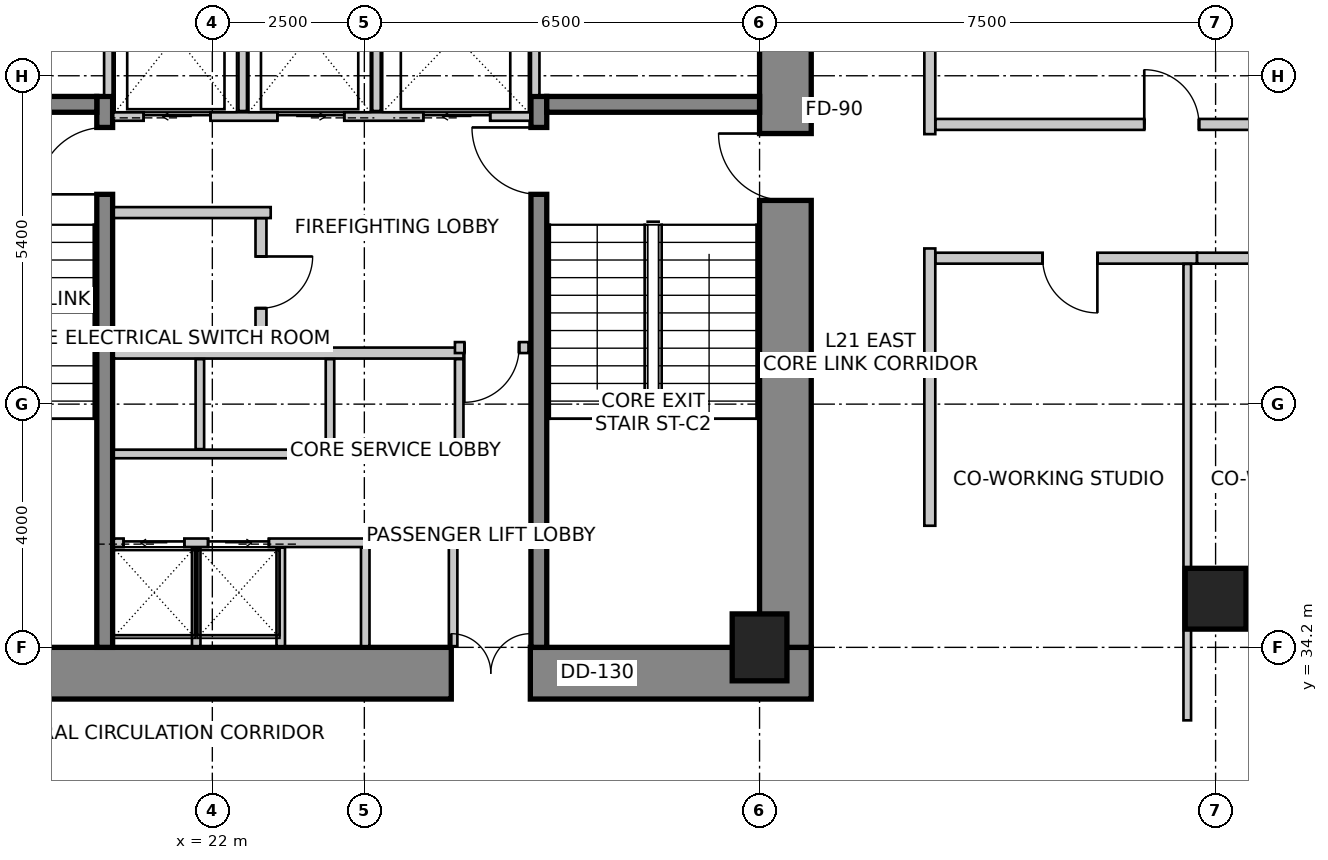
"""IFC4 building model, lengths in metres.
Left out: names, types, materials, properties, quantities, classifications, styles, units other than length and angle.
Written with IfcOpenShell. Run it as: python <this file> out.ifc"""

import sys

from ifc_helpers import new_model, si_unit, direction, frame, frame_2d, origin, origin_2d, place, context, subcontext, project, spatial, rectangle, extrude, source, transform, mapped, element, fill, save


model = new_model("IFC4")
c1 = context("Model", 3, precision=1e-05, world=origin(), true_north=direction((0.0, 1.0)))
c2 = subcontext(c1, "Body", "Model", "MODEL_VIEW")
j1 = project(units=[si_unit("LENGTHUNIT", "METRE"), si_unit("PLANEANGLEUNIT", "RADIAN")], contexts=[c1])
p1 = place(None, origin())
s1 = spatial("IfcSite", under=j1, at=p1, CompositionType="ELEMENT")
p2 = place(p1, origin())
s2 = spatial("IfcBuilding", under=s1, at=p2, CompositionType="ELEMENT")
p3 = place(p2, frame((0.0, 0.0, 87.0)))
s3 = spatial("IfcBuildingStorey", under=s2, at=p3, CompositionType="ELEMENT", Elevation=87.0)
p4 = place(p3, frame((15.75, 33.775, 0.0), z_axis=(0.0, 0.0, 1.0), x_axis=(1.0, 0.0, 0.0)))
e1 = element("IfcWall", 1, at=p4, inside=s3, PredefinedType="SHEAR", context=c2, shape_type="SweptSolid", body=[
    extrude(rectangle(XDim=16.1, YDim=0.85, at=frame_2d((8.05, 0.0))), origin(), (0.0, 0.0, 1.0), 4.0),
])
m1 = source(origin(), c2, "Body", "SweptSolid", [
    extrude(rectangle(XDim=1.3, YDim=2.15, at=frame_2d((0.65, 1.075))), frame((0.0, 0.435, 0.0), z_axis=(0.0, -1.0, 0.0), x_axis=(1.0, 0.0, 0.0)), (0.0, 0.0, 1.0), 0.87),
])
p5 = place(p4, frame((10.18, 0.0, 0.0)))
e2 = element("IfcOpeningElement", 2, at=p5, cuts=e1, PredefinedType="OPENING", context=c2, shape_type="MappedRepresentation", body=[
    mapped(m1, transform((0.0, 0.0, 0.0), scale=1.0)),
])
p6 = place(p3, frame((31.425, 34.2, 0.0), z_axis=(0.0, 0.0, 1.0), x_axis=(0.0, 1.0, 0.0)))
e3 = element("IfcWall", 3, at=p6, inside=s3, PredefinedType="SHEAR", context=c2, shape_type="SweptSolid", body=[
    extrude(rectangle(XDim=11.4, YDim=0.85, at=frame_2d((5.7, 0.0))), origin(), (0.0, 0.0, 1.0), 4.0),
])
m2 = source(origin(), c2, "Body", "SweptSolid", [
    extrude(rectangle(XDim=1.1, YDim=2.15, at=frame_2d((0.55, 1.075))), frame((0.0, 0.435, 0.0), z_axis=(0.0, -1.0, 0.0), x_axis=(1.0, 0.0, 0.0)), (0.0, 0.0, 1.0), 0.87),
])
p7 = place(p6, frame((7.35, 0.0, 0.0)))
e4 = element("IfcOpeningElement", 4, at=p7, cuts=e3, PredefinedType="OPENING", context=c2, shape_type="MappedRepresentation", body=[
    mapped(m2, transform((0.0, 0.0, 0.0), scale=1.0)),
])
p8 = place(p3, frame((20.23, 34.2, 0.0), z_axis=(0.0, 0.0, 1.0), x_axis=(0.0, 1.0, 0.0)))
e5 = element("IfcWall", 5, at=p8, inside=s3, PredefinedType="SHEAR", context=c2, shape_type="SweptSolid", body=[
    extrude(rectangle(XDim=9.06, YDim=0.26, at=frame_2d((4.53, 0.0))), origin(), (0.0, 0.0, 1.0), 4.0),
])
m3 = source(origin(), c2, "Body", "SweptSolid", [
    extrude(rectangle(XDim=1.1, YDim=2.15, at=frame_2d((0.55, 1.075))), frame((0.0, 0.14, 0.0), z_axis=(0.0, -1.0, 0.0), x_axis=(1.0, 0.0, 0.0)), (0.0, 0.0, 1.0), 0.28),
])
p9 = place(p8, frame((7.45, 0.0, 0.0)))
e6 = element("IfcOpeningElement", 6, at=p9, cuts=e5, PredefinedType="OPENING", context=c2, shape_type="MappedRepresentation", body=[
    mapped(m3, transform((0.0, 0.0, 0.0), scale=1.0)),
])
p10 = place(p3, frame((27.37, 34.2, 0.0), z_axis=(0.0, 0.0, 1.0), x_axis=(0.0, 1.0, 0.0)))
e7 = element("IfcWall", 7, at=p10, inside=s3, PredefinedType="SHEAR", context=c2, shape_type="SweptSolid", body=[
    extrude(rectangle(XDim=9.06, YDim=0.26, at=frame_2d((4.53, 0.0))), origin(), (0.0, 0.0, 1.0), 4.0),
])
p11 = place(p10, frame((7.45, 0.0, 0.0)))
e8 = element("IfcOpeningElement", 8, at=p11, cuts=e7, PredefinedType="OPENING", context=c2, shape_type="MappedRepresentation", body=[
    mapped(m3, transform((0.0, 0.0, 0.0), scale=1.0)),
])
for number, where, z_axis, x_axis in (
    (9, (16.6, 43.13, 0.0), (0.0, 0.0, 1.0), (1.0, 0.0, 0.0)),
    (10, (27.5, 43.13, 0.0), (0.0, 0.0, 1.0), (1.0, 0.0, 0.0)),
):
    element("IfcWall", number, at=place(p3, frame(where, z_axis=z_axis, x_axis=x_axis)), inside=s3, PredefinedType="SHEAR", context=c2, shape_type="SweptSolid", body=[
        extrude(rectangle(XDim=3.5, YDim=0.26, at=frame_2d((1.75, 0.0))), origin(), (0.0, 0.0, 1.0), 4.0),
    ])
m4 = source(origin(), c2, "Body", "SweptSolid", [
    extrude(rectangle(XDim=0.9, YDim=1.1, at=origin_2d()), origin(), (0.0, 0.0, 1.0), 4.0),
])
p12 = place(p3, frame((31.0, 34.2, 0.0), z_axis=(0.0, 0.0, 1.0), x_axis=(1.0, 0.0, 0.0)))
e11 = element("IfcColumn", 11, at=p12, inside=s3, PredefinedType="COLUMN", context=c2, shape_type="MappedRepresentation", body=[
    mapped(m4, transform((0.0, 0.0, 0.0), scale=1.0)),
])
m5 = source(origin(), c2, "Body", "SweptSolid", [
    extrude(rectangle(XDim=1.0, YDim=1.0, at=origin_2d()), origin(), (0.0, 0.0, 1.0), 4.0),
])
p13 = place(p3, frame((38.5, 35.0, 0.0), z_axis=(0.0, 0.0, 1.0), x_axis=(1.0, 0.0, 0.0)))
e12 = element("IfcColumn", 12, at=p13, inside=s3, PredefinedType="COLUMN", context=c2, shape_type="MappedRepresentation", body=[
    mapped(m5, transform((0.0, 0.0, 0.0), scale=1.0)),
])
p14 = place(p3, frame((20.37, 42.93, 0.0), z_axis=(0.0, 0.0, 1.0), x_axis=(1.0, 0.0, 0.0)))
e13 = element("IfcWall", 13, at=p14, inside=s3, PredefinedType="SOLIDWALL", context=c2, shape_type="SweptSolid", body=[
    extrude(rectangle(XDim=6.86, YDim=0.14, at=frame_2d((3.43, 0.0))), origin(), (0.0, 0.0, 1.0), 3.75),
])
m6 = source(origin(), c2, "Body", "SweptSolid", [
    extrude(rectangle(XDim=1.1, YDim=2.15, at=frame_2d((0.55, 1.075))), frame((0.0, 0.08, 0.0), z_axis=(0.0, -1.0, 0.0), x_axis=(1.0, 0.0, 0.0)), (0.0, 0.0, 1.0), 0.16),
])
p15 = place(p14, frame((0.5, 0.0, 0.0)))
e14 = element("IfcOpeningElement", 14, at=p15, cuts=e13, PredefinedType="OPENING", context=c2, shape_type="MappedRepresentation", body=[
    mapped(m6, transform((0.0, 0.0, 0.0), scale=1.0)),
])
p16 = place(p14, frame((2.7, 0.0, 0.0)))
e15 = element("IfcOpeningElement", 15, at=p16, cuts=e13, PredefinedType="OPENING", context=c2, shape_type="MappedRepresentation", body=[
    mapped(m6, transform((0.0, 0.0, 0.0), scale=1.0)),
])
p17 = place(p14, frame((5.1, 0.0, 0.0)))
e16 = element("IfcOpeningElement", 16, at=p17, cuts=e13, PredefinedType="OPENING", context=c2, shape_type="MappedRepresentation", body=[
    mapped(m6, transform((0.0, 0.0, 0.0), scale=1.0)),
])
for number, where, z_axis, x_axis in (
    (17, (20.29, 43.28, 0.0), (0.0, 0.0, 1.0), (0.0, 1.0, 0.0)),
    (18, (27.31, 43.28, 0.0), (0.0, 0.0, 1.0), (0.0, 1.0, 0.0)),
):
    element("IfcWall", number, at=place(p3, frame(where, z_axis=z_axis, x_axis=x_axis)), inside=s3, PredefinedType="SOLIDWALL", context=c2, shape_type="SweptSolid", body=[
        extrude(rectangle(XDim=2.3, YDim=0.14, at=frame_2d((1.15, 0.0))), origin(), (0.0, 0.0, 1.0), 3.75),
    ])
for number, where, z_axis, x_axis in (
    (19, (22.5, 43.02, 0.0), (0.0, 0.0, 1.0), (0.0, 1.0, 0.0)),
    (20, (24.7, 43.02, 0.0), (0.0, 0.0, 1.0), (0.0, 1.0, 0.0)),
):
    element("IfcWall", number, at=place(p3, frame(where, z_axis=z_axis, x_axis=x_axis)), inside=s3, PredefinedType="SOLIDWALL", context=c2, shape_type="SweptSolid", body=[
        extrude(rectangle(XDim=2.56, YDim=0.14, at=frame_2d((1.28, 0.0))), origin(), (0.0, 0.0, 1.0), 3.75),
    ])
p18 = place(p3, frame((20.38, 35.92, 0.0), z_axis=(0.0, 0.0, 1.0), x_axis=(1.0, 0.0, 0.0)))
e21 = element("IfcWall", 21, at=p18, inside=s3, PredefinedType="SOLIDWALL", context=c2, shape_type="SweptSolid", body=[
    extrude(rectangle(XDim=5.65, YDim=0.14, at=frame_2d((2.825, 0.0))), origin(), (0.0, 0.0, 1.0), 3.75),
])
m7 = source(origin(), c2, "Body", "SweptSolid", [
    extrude(rectangle(XDim=1.0, YDim=2.15, at=frame_2d((0.5, 1.075))), frame((0.0, 0.08, 0.0), z_axis=(0.0, -1.0, 0.0), x_axis=(1.0, 0.0, 0.0)), (0.0, 0.0, 1.0), 0.16),
])
p19 = place(p18, frame((0.16, 0.0, 0.0)))
e22 = element("IfcOpeningElement", 22, at=p19, cuts=e21, PredefinedType="OPENING", context=c2, shape_type="MappedRepresentation", body=[
    mapped(m7, transform((0.0, 0.0, 0.0), scale=1.0)),
])
p20 = place(p18, frame((1.55, 0.0, 0.0)))
e23 = element("IfcOpeningElement", 23, at=p20, cuts=e21, PredefinedType="OPENING", context=c2, shape_type="MappedRepresentation", body=[
    mapped(m7, transform((0.0, 0.0, 0.0), scale=1.0)),
])
for number, where, z_axis, x_axis in (
    (24, (25.96, 34.22, 0.0), (0.0, 0.0, 1.0), (0.0, 1.0, 0.0)),
    (25, (21.735, 34.22, 0.0), (0.0, 0.0, 1.0), (0.0, 1.0, 0.0)),
    (26, (23.125, 34.22, 0.0), (0.0, 0.0, 1.0), (0.0, 1.0, 0.0)),
    (27, (24.515, 34.22, 0.0), (0.0, 0.0, 1.0), (0.0, 1.0, 0.0)),
):
    element("IfcWall", number, at=place(p3, frame(where, z_axis=z_axis, x_axis=x_axis)), inside=s3, PredefinedType="SOLIDWALL", context=c2, shape_type="SweptSolid", body=[
        extrude(rectangle(XDim=1.62, YDim=0.14, at=frame_2d((0.81, 0.0))), origin(), (0.0, 0.0, 1.0), 3.042),
    ])
p21 = place(p3, frame((20.38, 37.38, 0.0), z_axis=(0.0, 0.0, 1.0), x_axis=(1.0, 0.0, 0.0)))
e28 = element("IfcWall", 28, at=p21, inside=s3, PredefinedType="SOLIDWALL", context=c2, shape_type="SweptSolid", body=[
    extrude(rectangle(XDim=5.75, YDim=0.14, at=frame_2d((2.875, 0.0))), origin(), (0.0, 0.0, 1.0), 3.75),
])
p22 = place(p3, frame((20.38, 39.04, 0.0), z_axis=(0.0, 0.0, 1.0), x_axis=(1.0, 0.0, 0.0)))
e29 = element("IfcWall", 29, at=p22, inside=s3, PredefinedType="SOLIDWALL", context=c2, shape_type="SweptSolid", body=[
    extrude(rectangle(XDim=5.75, YDim=0.18, at=frame_2d((2.875, 0.0))), origin(), (0.0, 0.0, 1.0), 3.75),
])
for number, where, z_axis, x_axis in (
    (30, (26.06, 37.46, 0.0), (0.0, 0.0, 1.0), (0.0, 1.0, 0.0)),
    (31, (21.795, 37.46, 0.0), (0.0, 0.0, 1.0), (0.0, 1.0, 0.0)),
    (32, (23.935, 37.46, 0.0), (0.0, 0.0, 1.0), (0.0, 1.0, 0.0)),
):
    element("IfcWall", number, at=place(p3, frame(where, z_axis=z_axis, x_axis=x_axis)), inside=s3, PredefinedType="SOLIDWALL", context=c2, shape_type="SweptSolid", body=[
        extrude(rectangle(XDim=1.48, YDim=0.14, at=frame_2d((0.74, 0.0))), origin(), (0.0, 0.0, 1.0), 3.75),
    ])
p23 = place(p3, frame((22.96, 41.35, 0.0), z_axis=(0.0, 0.0, 1.0), x_axis=(-1.0, 0.0, 0.0)))
e33 = element("IfcWall", 33, at=p23, inside=s3, PredefinedType="PARTITIONING", context=c2, shape_type="SweptSolid", body=[
    extrude(rectangle(XDim=2.58, YDim=0.18, at=frame_2d((1.29, 0.0))), origin(), (0.0, 0.0, 1.0), 3.75),
])
p24 = place(p3, frame((22.8, 41.256, 0.0), z_axis=(0.0, 0.0, 1.0), x_axis=(0.0, -1.0, 0.0)))
e34 = element("IfcWall", 34, at=p24, inside=s3, PredefinedType="PARTITIONING", context=c2, shape_type="SweptSolid", body=[
    extrude(rectangle(XDim=2.106, YDim=0.18, at=frame_2d((1.053, 0.0))), origin(), (0.0, 0.0, 1.0), 3.75),
])
m8 = source(origin(), c2, "Body", "SweptSolid", [
    extrude(rectangle(XDim=0.85, YDim=2.15, at=frame_2d((0.425, 1.075))), frame((0.0, 0.1, 0.0), z_axis=(0.0, -1.0, 0.0), x_axis=(1.0, 0.0, 0.0)), (0.0, 0.0, 1.0), 0.2),
])
p25 = place(p24, frame((0.628, 0.0, 0.0)))
e35 = element("IfcOpeningElement", 35, at=p25, cuts=e34, PredefinedType="OPENING", context=c2, shape_type="MappedRepresentation", body=[
    mapped(m8, transform((0.0, 0.0, 0.0), scale=1.0)),
])
p26 = place(p3, frame((27.2, 39.13, 0.0), z_axis=(0.0, 0.0, 1.0), x_axis=(-1.0, 0.0, 0.0)))
e36 = element("IfcWall", 36, at=p26, inside=s3, PredefinedType="PARTITIONING", context=c2, shape_type="SweptSolid", body=[
    extrude(rectangle(XDim=1.21, YDim=0.18, at=frame_2d((0.605, 0.0))), origin(), (0.0, 0.0, 1.0), 3.75),
])
m9 = source(origin(), c2, "Body", "SweptSolid", [
    extrude(rectangle(XDim=0.9, YDim=2.15, at=frame_2d((0.45, 1.075))), frame((0.0, 0.1, 0.0), z_axis=(0.0, -1.0, 0.0), x_axis=(1.0, 0.0, 0.0)), (0.0, 0.0, 1.0), 0.2),
])
p27 = place(p26, frame((0.155, 0.0, 0.0)))
e37 = element("IfcOpeningElement", 37, at=p27, cuts=e36, PredefinedType="OPENING", context=c2, shape_type="MappedRepresentation", body=[
    mapped(m9, transform((0.0, 0.0, 0.0), scale=1.0)),
])
p28 = place(p3, frame((33.8, 40.76, 0.0), z_axis=(0.0, 0.0, 1.0), x_axis=(0.0, -1.0, 0.0)))
e38 = element("IfcWall", 38, at=p28, inside=s3, PredefinedType="PARTITIONING", context=c2, shape_type="SweptSolid", body=[
    extrude(rectangle(XDim=4.56, YDim=0.18, at=frame_2d((2.28, 0.0))), origin(), (0.0, 0.0, 1.0), 3.75),
])
p29 = place(p3, frame((33.8, 46.356, 0.0), z_axis=(0.0, 0.0, 1.0), x_axis=(0.0, -1.0, 0.0)))
e39 = element("IfcWall", 39, at=p29, inside=s3, PredefinedType="PARTITIONING", context=c2, shape_type="SweptSolid", body=[
    extrude(rectangle(XDim=3.716, YDim=0.18, at=frame_2d((1.858, 0.0))), origin(), (0.0, 0.0, 1.0), 3.188),
])
p30 = place(p3, frame((38.194, 40.6, 0.0), z_axis=(0.0, 0.0, 1.0), x_axis=(-1.0, 0.0, 0.0)))
e40 = element("IfcWall", 40, at=p30, inside=s3, PredefinedType="PARTITIONING", context=c2, shape_type="SweptSolid", body=[
    extrude(rectangle(XDim=4.3, YDim=0.18, at=frame_2d((2.15, 0.0))), origin(), (0.0, 0.0, 1.0), 3.335),
])
p31 = place(p30, frame((1.638, 0.0, 0.0)))
e41 = element("IfcOpeningElement", 41, at=p31, cuts=e40, PredefinedType="OPENING", context=c2, shape_type="MappedRepresentation", body=[
    mapped(m9, transform((0.0, 0.0, 0.0), scale=1.0)),
])
p32 = place(p3, frame((42.427, 40.6, 0.0), z_axis=(0.0, 0.0, 1.0), x_axis=(-1.0, 0.0, 0.0)))
e42 = element("IfcWall", 42, at=p32, inside=s3, PredefinedType="PARTITIONING", context=c2, shape_type="SweptSolid", body=[
    extrude(rectangle(XDim=4.231, YDim=0.18, at=frame_2d((2.115, 0.0))), origin(), (0.0, 0.0, 1.0), 3.125),
])
p33 = place(p32, frame((1.605, 0.0, 0.0)))
e43 = element("IfcOpeningElement", 43, at=p33, cuts=e42, PredefinedType="OPENING", context=c2, shape_type="MappedRepresentation", body=[
    mapped(m9, transform((0.0, 0.0, 0.0), scale=1.0)),
])
p34 = place(p3, frame((33.894, 42.8, 0.0), z_axis=(0.0, 0.0, 1.0), x_axis=(1.0, 0.0, 0.0)))
e44 = element("IfcWall", 44, at=p34, inside=s3, PredefinedType="PARTITIONING", context=c2, shape_type="SweptSolid", body=[
    extrude(rectangle(XDim=7.766, YDim=0.18, at=frame_2d((3.883, 0.0))), origin(), (0.0, 0.0, 1.0), 3.125),
])
p35 = place(p34, frame((3.433, 0.0, 0.0)))
e45 = element("IfcOpeningElement", 45, at=p35, cuts=e44, PredefinedType="OPENING", context=c2, shape_type="MappedRepresentation", body=[
    mapped(m9, transform((0.0, 0.0, 0.0), scale=1.0)),
])
p36 = place(p3, frame((38.034, 40.506, 0.0), z_axis=(0.0, 0.0, 1.0), x_axis=(0.0, -1.0, 0.0)))
e46 = element("IfcWall", 46, at=p36, inside=s3, PredefinedType="PARTITIONING", context=c2, shape_type="SweptSolid", body=[
    extrude(rectangle(XDim=7.506, YDim=0.125, at=frame_2d((3.753, 0.0))), origin(), (0.0, 0.0, 1.0), 3.335),
])
m10 = source(origin(), c2, "Body", "SweptSolid", [
    extrude(rectangle(XDim=1.1, YDim=2.15, at=frame_2d((0.55, 1.075))), frame((0.0, 0.025, 0.0), z_axis=(0.0, -1.0, 0.0), x_axis=(1.0, 0.0, 0.0)), (0.0, 0.0, 1.0), 0.05),
])
p37 = place(p15, origin())
e47 = element("IfcDoor", 47, at=p37, inside=s3, OperationType="SLIDING_TO_LEFT", PredefinedType="DOOR", context=c2, shape_type="MappedRepresentation", body=[
    mapped(m10, transform((0.0, 0.0, 0.0), scale=1.0)),
])
fill(e14, e47)
p38 = place(p16, origin())
e48 = element("IfcDoor", 48, at=p38, inside=s3, OperationType="SLIDING_TO_RIGHT", PredefinedType="DOOR", context=c2, shape_type="MappedRepresentation", body=[
    mapped(m10, transform((0.0, 0.0, 0.0), scale=1.0)),
])
fill(e15, e48)
m11 = source(origin(), c2, "Body", "SweptSolid", [
    extrude(rectangle(XDim=1.1, YDim=2.15, at=frame_2d((0.55, 1.075))), frame((0.0, 0.025, 0.0), z_axis=(0.0, -1.0, 0.0), x_axis=(1.0, 0.0, 0.0)), (0.0, 0.0, 1.0), 0.05),
])
p39 = place(p17, origin())
e49 = element("IfcDoor", 49, at=p39, inside=s3, OperationType="SLIDING_TO_LEFT", PredefinedType="DOOR", context=c2, shape_type="MappedRepresentation", body=[
    mapped(m11, transform((0.0, 0.0, 0.0), scale=1.0)),
])
fill(e16, e49)
m12 = source(origin(), c2, "Body", "SweptSolid", [
    extrude(rectangle(XDim=1.0, YDim=2.15, at=frame_2d((0.5, 1.075))), frame((0.0, 0.025, 0.0), z_axis=(0.0, -1.0, 0.0), x_axis=(1.0, 0.0, 0.0)), (0.0, 0.0, 1.0), 0.05),
])
p40 = place(p19, origin())
e50 = element("IfcDoor", 50, at=p40, inside=s3, OperationType="SLIDING_TO_LEFT", PredefinedType="DOOR", context=c2, shape_type="MappedRepresentation", body=[
    mapped(m12, transform((0.0, 0.0, 0.0), scale=1.0)),
])
fill(e22, e50)
p41 = place(p20, origin())
e51 = element("IfcDoor", 51, at=p41, inside=s3, OperationType="SLIDING_TO_RIGHT", PredefinedType="DOOR", context=c2, shape_type="MappedRepresentation", body=[
    mapped(m12, transform((0.0, 0.0, 0.0), scale=1.0)),
])
fill(e23, e51)
m13 = source(origin(), c2, "Body", "SweptSolid", [
    extrude(rectangle(XDim=1.1, YDim=2.15, at=frame_2d((0.55, 1.075))), frame((0.0, 0.025, 0.0), z_axis=(0.0, -1.0, 0.0), x_axis=(1.0, 0.0, 0.0)), (0.0, 0.0, 1.0), 0.05),
])
p42 = place(p9, origin())
e52 = element("IfcDoor", 52, at=p42, inside=s3, OperationType="SINGLE_SWING_LEFT", PredefinedType="DOOR", context=c2, shape_type="MappedRepresentation", body=[
    mapped(m13, transform((0.0, 0.0, 0.0), scale=1.0)),
])
fill(e6, e52)
p43 = place(p11, origin())
e53 = element("IfcDoor", 53, at=p43, inside=s3, OperationType="SINGLE_SWING_RIGHT", PredefinedType="DOOR", context=c2, shape_type="MappedRepresentation", body=[
    mapped(m13, transform((0.0, 0.0, 0.0), scale=1.0)),
])
fill(e8, e53)
p44 = place(p7, origin())
e54 = element("IfcDoor", 54, at=p44, inside=s3, OperationType="SINGLE_SWING_RIGHT", PredefinedType="DOOR", context=c2, shape_type="MappedRepresentation", body=[
    mapped(m13, transform((0.0, 0.0, 0.0), scale=1.0)),
])
fill(e4, e54)
m14 = source(origin(), c2, "Body", "SweptSolid", [
    extrude(rectangle(XDim=1.3, YDim=2.15, at=frame_2d((0.65, 1.075))), frame((0.0, 0.025, 0.0), z_axis=(0.0, -1.0, 0.0), x_axis=(1.0, 0.0, 0.0)), (0.0, 0.0, 1.0), 0.05),
])
p45 = place(p5, origin())
e55 = element("IfcDoor", 55, at=p45, inside=s3, OperationType="DOUBLE_DOOR_SINGLE_SWING", PredefinedType="DOOR", context=c2, shape_type="MappedRepresentation", body=[
    mapped(m14, transform((0.0, 0.0, 0.0), scale=1.0)),
])
fill(e2, e55)
m15 = source(origin(), c2, "Body", "SweptSolid", [
    extrude(rectangle(XDim=0.85, YDim=2.15, at=frame_2d((0.425, 1.075))), frame((0.0, 0.025, 0.0), z_axis=(0.0, -1.0, 0.0), x_axis=(1.0, 0.0, 0.0)), (0.0, 0.0, 1.0), 0.05),
])
p46 = place(p25, origin())
e56 = element("IfcDoor", 56, at=p46, inside=s3, OperationType="SINGLE_SWING_LEFT", PredefinedType="DOOR", context=c2, shape_type="MappedRepresentation", body=[
    mapped(m15, transform((0.0, 0.0, 0.0), scale=1.0)),
])
fill(e35, e56)
m16 = source(origin(), c2, "Body", "SweptSolid", [
    extrude(rectangle(XDim=0.9, YDim=2.15, at=frame_2d((0.45, 1.075))), frame((0.0, 0.025, 0.0), z_axis=(0.0, -1.0, 0.0), x_axis=(1.0, 0.0, 0.0)), (0.0, 0.0, 1.0), 0.05),
])
p47 = place(p27, origin())
e57 = element("IfcDoor", 57, at=p47, inside=s3, OperationType="SINGLE_SWING_RIGHT", PredefinedType="DOOR", context=c2, shape_type="MappedRepresentation", body=[
    mapped(m16, transform((0.0, 0.0, 0.0), scale=1.0)),
])
fill(e37, e57)
m17 = source(origin(), c2, "Body", "SweptSolid", [
    extrude(rectangle(XDim=0.9, YDim=2.15, at=frame_2d((0.45, 1.075))), frame((0.0, 0.025, 0.0), z_axis=(0.0, -1.0, 0.0), x_axis=(1.0, 0.0, 0.0)), (0.0, 0.0, 1.0), 0.05),
])
p48 = place(p31, origin())
e58 = element("IfcDoor", 58, at=p48, inside=s3, OperationType="SINGLE_SWING_LEFT", PredefinedType="DOOR", context=c2, shape_type="MappedRepresentation", body=[
    mapped(m17, transform((0.0, 0.0, 0.0), scale=1.0)),
])
fill(e41, e58)
p49 = place(p35, origin())
e59 = element("IfcDoor", 59, at=p49, inside=s3, OperationType="SINGLE_SWING_LEFT", PredefinedType="DOOR", context=c2, shape_type="MappedRepresentation", body=[
    mapped(m17, transform((0.0, 0.0, 0.0), scale=1.0)),
])
fill(e45, e59)
save(model, sys.argv[1])
